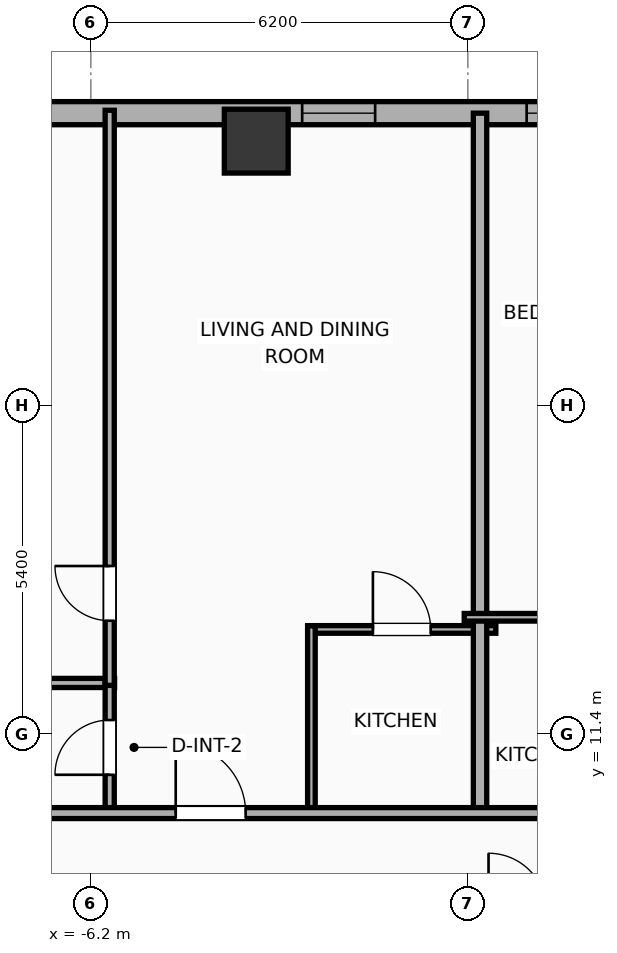
"""IFC4 building model, lengths in metres.
Left out: names, types, materials, properties, quantities, classifications, styles, units other than length and angle.
Written with IfcOpenShell. Run it as: python <this file> out.ifc"""

import sys

from ifc_helpers import new_model, si_unit, direction, frame, frame_2d, origin, origin_2d, place, context, subcontext, project, spatial, rectangle, hollow_rectangle, extrude, element, fill, save


model = new_model("IFC4")
c1 = context("Model", 3, precision=1e-05, world=origin(), true_north=direction((0.0, 1.0)))
c2 = subcontext(c1, "Body", "Model", "MODEL_VIEW")
j1 = project(units=[si_unit("LENGTHUNIT", "METRE"), si_unit("PLANEANGLEUNIT", "RADIAN")], contexts=[c1])
p1 = place(None, origin())
s1 = spatial("IfcSite", under=j1, at=p1, CompositionType="ELEMENT")
p2 = place(p1, origin())
s2 = spatial("IfcBuilding", under=s1, at=p2, CompositionType="ELEMENT")
p3 = place(p2, frame((0.0, 0.0, 101.4)))
s3 = spatial("IfcBuildingStorey", under=s2, at=p3, CompositionType="ELEMENT", Elevation=101.4)
p4 = place(p3, frame((-3.48, 21.15, 0.0), z_axis=(0.0, 0.0, 1.0), x_axis=(1.0, 0.0, 0.0)))
e1 = element("IfcColumn", 1, at=p4, inside=s3, PredefinedType="COLUMN", context=c2, shape_type="SweptSolid", body=[
    extrude(hollow_rectangle(XDim=1.05, YDim=1.05, WallThickness=0.036, at=origin_2d()), origin(), (0.0, 0.0, 1.0), 3.9),
])
p5 = place(p3, frame((-25.381, 21.61, 0.0), z_axis=(0.0, 0.0, 1.0), x_axis=(1.0, 0.0, 0.0)))
e2 = element("IfcWall", 2, at=p5, inside=s3, PredefinedType="ELEMENTEDWALL", context=c2, shape_type="SweptSolid", body=[
    extrude(rectangle(XDim=54.763, YDim=0.38, at=frame_2d((27.381, 0.0))), origin(), (0.0, 0.0, 1.0), 3.65),
])
p6 = place(p5, frame((45.067, 0.0, 0.75)))
e3 = element("IfcOpeningElement", 3, at=p6, cuts=e2, PredefinedType="OPENING", context=c2, shape_type="SweptSolid", body=[
    extrude(rectangle(XDim=2.4, YDim=2.1, at=frame_2d((1.2, 1.05))), frame((0.0, 0.2, 0.0), z_axis=(0.0, -1.0, 0.0), x_axis=(1.0, 0.0, 0.0)), (0.0, 0.0, 1.0), 0.4),
])
p7 = place(p5, frame((4.076, 0.0, 0.75)))
e4 = element("IfcOpeningElement", 4, at=p7, cuts=e2, PredefinedType="OPENING", context=c2, shape_type="SweptSolid", body=[
    extrude(rectangle(XDim=1.2, YDim=2.05, at=frame_2d((0.6, 1.025))), frame((0.0, 0.2, 0.0), z_axis=(0.0, -1.0, 0.0), x_axis=(1.0, 0.0, 0.0)), (0.0, 0.0, 1.0), 0.4),
])
p8 = place(p5, frame((9.395, 0.0, 0.75)))
e5 = element("IfcOpeningElement", 5, at=p8, cuts=e2, PredefinedType="OPENING", context=c2, shape_type="SweptSolid", body=[
    extrude(rectangle(XDim=0.85, YDim=2.05, at=frame_2d((0.425, 1.025))), frame((0.0, 0.2, 0.0), z_axis=(0.0, -1.0, 0.0), x_axis=(1.0, 0.0, 0.0)), (0.0, 0.0, 1.0), 0.4),
])
p9 = place(p5, frame((7.205, 0.0, 0.75)))
e6 = element("IfcOpeningElement", 6, at=p9, cuts=e2, PredefinedType="OPENING", context=c2, shape_type="SweptSolid", body=[
    extrude(rectangle(XDim=1.2, YDim=2.05, at=frame_2d((0.6, 1.025))), frame((0.0, 0.2, 0.0), z_axis=(0.0, -1.0, 0.0), x_axis=(1.0, 0.0, 0.0)), (0.0, 0.0, 1.0), 0.4),
])
p10 = place(p5, frame((13.676, 0.0, 0.75)))
e7 = element("IfcOpeningElement", 7, at=p10, cuts=e2, PredefinedType="OPENING", context=c2, shape_type="SweptSolid", body=[
    extrude(rectangle(XDim=1.2, YDim=2.05, at=frame_2d((0.6, 1.025))), frame((0.0, 0.2, 0.0), z_axis=(0.0, -1.0, 0.0), x_axis=(1.0, 0.0, 0.0)), (0.0, 0.0, 1.0), 0.4),
])
p11 = place(p5, frame((17.136, 0.0, 0.75)))
e8 = element("IfcOpeningElement", 8, at=p11, cuts=e2, PredefinedType="OPENING", context=c2, shape_type="SweptSolid", body=[
    extrude(rectangle(XDim=1.2, YDim=2.05, at=frame_2d((0.6, 1.025))), frame((0.0, 0.2, 0.0), z_axis=(0.0, -1.0, 0.0), x_axis=(1.0, 0.0, 0.0)), (0.0, 0.0, 1.0), 0.4),
])
p12 = place(p5, frame((22.656, 0.0, 0.75)))
e9 = element("IfcOpeningElement", 9, at=p12, cuts=e2, PredefinedType="OPENING", context=c2, shape_type="SweptSolid", body=[
    extrude(rectangle(XDim=1.2, YDim=2.05, at=frame_2d((0.6, 1.025))), frame((0.0, 0.2, 0.0), z_axis=(0.0, -1.0, 0.0), x_axis=(1.0, 0.0, 0.0)), (0.0, 0.0, 1.0), 0.4),
])
p13 = place(p5, frame((29.443, 0.0, 0.75)))
e10 = element("IfcOpeningElement", 10, at=p13, cuts=e2, PredefinedType="OPENING", context=c2, shape_type="SweptSolid", body=[
    extrude(rectangle(XDim=1.2, YDim=2.05, at=frame_2d((0.6, 1.025))), frame((0.0, 0.2, 0.0), z_axis=(0.0, -1.0, 0.0), x_axis=(1.0, 0.0, 0.0)), (0.0, 0.0, 1.0), 0.4),
])
p14 = place(p5, frame((26.348, 0.0, 0.75)))
e11 = element("IfcOpeningElement", 11, at=p14, cuts=e2, PredefinedType="OPENING", context=c2, shape_type="SweptSolid", body=[
    extrude(rectangle(XDim=1.2, YDim=2.05, at=frame_2d((0.6, 1.025))), frame((0.0, 0.2, 0.0), z_axis=(0.0, -1.0, 0.0), x_axis=(1.0, 0.0, 0.0)), (0.0, 0.0, 1.0), 0.4),
])
p15 = place(p5, frame((33.596, 0.0, 0.75)))
e12 = element("IfcOpeningElement", 12, at=p15, cuts=e2, PredefinedType="OPENING", context=c2, shape_type="SweptSolid", body=[
    extrude(rectangle(XDim=1.2, YDim=2.05, at=frame_2d((0.6, 1.025))), frame((0.0, 0.2, 0.0), z_axis=(0.0, -1.0, 0.0), x_axis=(1.0, 0.0, 0.0)), (0.0, 0.0, 1.0), 0.4),
])
p16 = place(p5, frame((36.014, 0.0, 0.75)))
e13 = element("IfcOpeningElement", 13, at=p16, cuts=e2, PredefinedType="OPENING", context=c2, shape_type="SweptSolid", body=[
    extrude(rectangle(XDim=1.2, YDim=2.05, at=frame_2d((0.6, 1.025))), frame((0.0, 0.2, 0.0), z_axis=(0.0, -1.0, 0.0), x_axis=(1.0, 0.0, 0.0)), (0.0, 0.0, 1.0), 0.4),
])
p17 = place(p5, frame((40.814, 0.0, 0.75)))
e14 = element("IfcOpeningElement", 14, at=p17, cuts=e2, PredefinedType="OPENING", context=c2, shape_type="SweptSolid", body=[
    extrude(rectangle(XDim=1.2, YDim=2.05, at=frame_2d((0.6, 1.025))), frame((0.0, 0.2, 0.0), z_axis=(0.0, -1.0, 0.0), x_axis=(1.0, 0.0, 0.0)), (0.0, 0.0, 1.0), 0.4),
])
p18 = place(p5, frame((49.385, 0.0, 0.75)))
e15 = element("IfcOpeningElement", 15, at=p18, cuts=e2, PredefinedType="OPENING", context=c2, shape_type="SweptSolid", body=[
    extrude(rectangle(XDim=1.2, YDim=2.05, at=frame_2d((0.6, 1.025))), frame((0.0, 0.2, 0.0), z_axis=(0.0, -1.0, 0.0), x_axis=(1.0, 0.0, 0.0)), (0.0, 0.0, 1.0), 0.4),
])
p19 = place(p5, frame((52.181, 0.0, 0.75)))
e16 = element("IfcOpeningElement", 16, at=p19, cuts=e2, PredefinedType="OPENING", context=c2, shape_type="SweptSolid", body=[
    extrude(rectangle(XDim=1.2, YDim=2.05, at=frame_2d((0.6, 1.025))), frame((0.0, 0.2, 0.0), z_axis=(0.0, -1.0, 0.0), x_axis=(1.0, 0.0, 0.0)), (0.0, 0.0, 1.0), 0.4),
])
p20 = place(p3, frame((-9.66, 12.24, 0.0), z_axis=(0.0, 0.0, 1.0), x_axis=(1.0, 0.0, 0.0)))
e17 = element("IfcWall", 17, at=p20, inside=s3, PredefinedType="PLUMBINGWALL", context=c2, shape_type="SweptSolid", body=[
    extrude(rectangle(XDim=3.85, YDim=0.15, at=frame_2d((1.925, 0.0))), origin(), (0.0, 0.0, 1.0), 3.65),
])
p21 = place(p3, frame((-5.89, 10.08, 0.0), z_axis=(0.0, 0.0, 1.0), x_axis=(0.0, 1.0, 0.0)))
e18 = element("IfcWall", 18, at=p21, inside=s3, PredefinedType="PLUMBINGWALL", context=c2, shape_type="SweptSolid", body=[
    extrude(rectangle(XDim=2.2, YDim=0.15, at=frame_2d((1.1, 0.0))), origin(), (0.0, 0.0, 1.0), 3.65),
])
p22 = place(p21, frame((0.65, 0.0, 0.0)))
e19 = element("IfcOpeningElement", 19, at=p22, cuts=e18, PredefinedType="OPENING", context=c2, shape_type="SweptSolid", body=[
    extrude(rectangle(XDim=0.9, YDim=2.05, at=frame_2d((0.45, 1.025))), frame((0.0, 0.085, 0.0), z_axis=(0.0, -1.0, 0.0), x_axis=(1.0, 0.0, 0.0)), (0.0, 0.0, 1.0), 0.17),
])
p23 = place(p3, frame((-5.89, 12.2, 0.0), z_axis=(0.0, 0.0, 1.0), x_axis=(0.0, 1.0, 0.0)))
e20 = element("IfcWall", 20, at=p23, inside=s3, PredefinedType="PLUMBINGWALL", context=c2, shape_type="SweptSolid", body=[
    extrude(rectangle(XDim=9.458, YDim=0.15, at=frame_2d((4.729, 0.0))), origin(), (0.0, 0.0, 1.0), 3.65),
])
p24 = place(p23, frame((1.063, 0.0, 0.0)))
e21 = element("IfcOpeningElement", 21, at=p24, cuts=e20, PredefinedType="OPENING", context=c2, shape_type="SweptSolid", body=[
    extrude(rectangle(XDim=0.9, YDim=2.05, at=frame_2d((0.45, 1.025))), frame((0.0, 0.085, 0.0), z_axis=(0.0, -1.0, 0.0), x_axis=(1.0, 0.0, 0.0)), (0.0, 0.0, 1.0), 0.17),
])
p25 = place(p3, frame((-2.633, 13.12, 0.0), z_axis=(0.0, 0.0, 1.0), x_axis=(1.0, 0.0, 0.0)))
e22 = element("IfcWall", 22, at=p25, inside=s3, PredefinedType="PARTITIONING", context=c2, shape_type="SweptSolid", body=[
    extrude(rectangle(XDim=3.093, YDim=0.125, at=frame_2d((1.546, 0.0))), origin(), (0.0, 0.0, 1.0), 3.65),
])
p26 = place(p25, frame((1.072, 0.0, 0.0)))
e23 = element("IfcOpeningElement", 23, at=p26, cuts=e22, PredefinedType="OPENING", context=c2, shape_type="SweptSolid", body=[
    extrude(rectangle(XDim=0.95, YDim=2.05, at=frame_2d((0.475, 1.025))), frame((0.0, 0.073, 0.0), z_axis=(0.0, -1.0, 0.0), x_axis=(1.0, 0.0, 0.0)), (0.0, 0.0, 1.0), 0.145),
])
p27 = place(p3, frame((-2.573, 10.08, 0.0), z_axis=(0.0, 0.0, 1.0), x_axis=(0.0, 1.0, 0.0)))
e24 = element("IfcWall", 24, at=p27, inside=s3, PredefinedType="PARTITIONING", context=c2, shape_type="SweptSolid", body=[
    extrude(rectangle(XDim=3.1, YDim=0.125, at=frame_2d((1.55, 0.0))), origin(), (0.0, 0.0, 1.0), 3.65),
])
p28 = place(p3, frame((0.2, 10.02, 0.0), z_axis=(0.0, 0.0, 1.0), x_axis=(0.0, 1.0, 0.0)))
e25 = element("IfcWall", 25, at=p28, inside=s3, PredefinedType="PARTITIONING", context=c2, shape_type="SweptSolid", body=[
    extrude(rectangle(XDim=11.59, YDim=0.22, at=frame_2d((5.795, 0.0))), origin(), (0.0, 0.0, 1.0), 3.65),
])
p29 = place(p3, frame((-0.06, 13.32, 0.0), z_axis=(0.0, 0.0, 1.0), x_axis=(1.0, 0.0, 0.0)))
e26 = element("IfcWall", 26, at=p29, inside=s3, PredefinedType="PARTITIONING", context=c2, shape_type="SweptSolid", body=[
    extrude(rectangle(XDim=3.113, YDim=0.125, at=frame_2d((1.557, 0.0))), origin(), (0.0, 0.0, 1.0), 3.65),
])
p30 = place(p3, frame((-29.21, 10.1, 0.0), z_axis=(0.0, 0.0, 1.0), x_axis=(1.0, 0.0, 0.0)))
e27 = element("IfcWall", 27, at=p30, inside=s3, PredefinedType="PARTITIONING", context=c2, shape_type="SweptSolid", body=[
    extrude(rectangle(XDim=62.42, YDim=0.18, at=frame_2d((31.21, 0.0))), origin(), (0.0, 0.0, 1.0), 3.65),
])
p31 = place(p30, frame((4.906, 0.0, 0.0)))
e28 = element("IfcOpeningElement", 28, at=p31, cuts=e27, PredefinedType="OPENING", context=c2, shape_type="SweptSolid", body=[
    extrude(rectangle(XDim=1.15, YDim=2.05, at=frame_2d((0.575, 1.025))), frame((0.0, 0.1, 0.0), z_axis=(0.0, -1.0, 0.0), x_axis=(1.0, 0.0, 0.0)), (0.0, 0.0, 1.0), 0.2),
])
p32 = place(p30, frame((14.812, 0.0, 0.0)))
e29 = element("IfcOpeningElement", 29, at=p32, cuts=e27, PredefinedType="OPENING", context=c2, shape_type="SweptSolid", body=[
    extrude(rectangle(XDim=1.15, YDim=2.05, at=frame_2d((0.575, 1.025))), frame((0.0, 0.1, 0.0), z_axis=(0.0, -1.0, 0.0), x_axis=(1.0, 0.0, 0.0)), (0.0, 0.0, 1.0), 0.2),
])
p33 = place(p30, frame((24.406, 0.0, 0.0)))
e30 = element("IfcOpeningElement", 30, at=p33, cuts=e27, PredefinedType="OPENING", context=c2, shape_type="SweptSolid", body=[
    extrude(rectangle(XDim=1.15, YDim=2.05, at=frame_2d((0.575, 1.025))), frame((0.0, 0.1, 0.0), z_axis=(0.0, -1.0, 0.0), x_axis=(1.0, 0.0, 0.0)), (0.0, 0.0, 1.0), 0.2),
])
p34 = place(p30, frame((33.981, 0.0, 0.0)))
e31 = element("IfcOpeningElement", 31, at=p34, cuts=e27, PredefinedType="OPENING", context=c2, shape_type="SweptSolid", body=[
    extrude(rectangle(XDim=1.15, YDim=2.05, at=frame_2d((0.575, 1.025))), frame((0.0, 0.1, 0.0), z_axis=(0.0, -1.0, 0.0), x_axis=(1.0, 0.0, 0.0)), (0.0, 0.0, 1.0), 0.2),
])
p35 = place(p30, frame((43.138, 0.0, 0.0)))
e32 = element("IfcOpeningElement", 32, at=p35, cuts=e27, PredefinedType="OPENING", context=c2, shape_type="SweptSolid", body=[
    extrude(rectangle(XDim=1.15, YDim=2.05, at=frame_2d((0.575, 1.025))), frame((0.0, 0.1, 0.0), z_axis=(0.0, -1.0, 0.0), x_axis=(1.0, 0.0, 0.0)), (0.0, 0.0, 1.0), 0.2),
])
p36 = place(p30, frame((51.777, 0.0, 0.0)))
e33 = element("IfcOpeningElement", 33, at=p36, cuts=e27, PredefinedType="OPENING", context=c2, shape_type="SweptSolid", body=[
    extrude(rectangle(XDim=0.9, YDim=2.05, at=frame_2d((0.45, 1.025))), frame((0.0, 0.1, 0.0), z_axis=(0.0, -1.0, 0.0), x_axis=(1.0, 0.0, 0.0)), (0.0, 0.0, 1.0), 0.2),
])
p37 = place(p30, frame((58.718, 0.0, 0.0)))
e34 = element("IfcOpeningElement", 34, at=p37, cuts=e27, PredefinedType="OPENING", context=c2, shape_type="SweptSolid", body=[
    extrude(rectangle(XDim=0.9, YDim=2.05, at=frame_2d((0.45, 1.025))), frame((0.0, 0.1, 0.0), z_axis=(0.0, -1.0, 0.0), x_axis=(1.0, 0.0, 0.0)), (0.0, 0.0, 1.0), 0.2),
])
p38 = place(p12, origin())
e35 = element("IfcWindow", 35, at=p38, inside=s3, PartitioningType="SINGLE_PANEL", PredefinedType="WINDOW", context=c2, shape_type="SweptSolid", body=[
    extrude(rectangle(XDim=1.2, YDim=2.05, at=frame_2d((0.6, 1.025))), frame((0.0, 0.03, 0.0), z_axis=(0.0, -1.0, 0.0), x_axis=(1.0, 0.0, 0.0)), (0.0, 0.0, 1.0), 0.06),
])
fill(e9, e35)
p39 = place(p14, origin())
e36 = element("IfcWindow", 36, at=p39, inside=s3, PartitioningType="SINGLE_PANEL", PredefinedType="WINDOW", context=c2, shape_type="SweptSolid", body=[
    extrude(rectangle(XDim=1.2, YDim=2.05, at=frame_2d((0.6, 1.025))), frame((0.0, 0.03, 0.0), z_axis=(0.0, -1.0, 0.0), x_axis=(1.0, 0.0, 0.0)), (0.0, 0.0, 1.0), 0.06),
])
fill(e11, e36)
p40 = place(p22, origin())
e37 = element("IfcDoor", 37, at=p40, inside=s3, OperationType="SINGLE_SWING_LEFT", PredefinedType="DOOR", context=c2, shape_type="SweptSolid", body=[
    extrude(rectangle(XDim=0.9, YDim=2.05, at=frame_2d((0.45, 1.025))), frame((0.0, 0.025, 0.0), z_axis=(0.0, -1.0, 0.0), x_axis=(1.0, 0.0, 0.0)), (0.0, 0.0, 1.0), 0.05),
])
fill(e19, e37)
p41 = place(p24, origin())
e38 = element("IfcDoor", 38, at=p41, inside=s3, OperationType="SINGLE_SWING_RIGHT", PredefinedType="DOOR", context=c2, shape_type="SweptSolid", body=[
    extrude(rectangle(XDim=0.9, YDim=2.05, at=frame_2d((0.45, 1.025))), frame((0.0, 0.025, 0.0), z_axis=(0.0, -1.0, 0.0), x_axis=(1.0, 0.0, 0.0)), (0.0, 0.0, 1.0), 0.05),
])
fill(e21, e38)
p42 = place(p26, origin())
e39 = element("IfcDoor", 39, at=p42, inside=s3, OperationType="SINGLE_SWING_LEFT", PredefinedType="DOOR", context=c2, shape_type="SweptSolid", body=[
    extrude(rectangle(XDim=0.95, YDim=2.05, at=frame_2d((0.475, 1.025))), frame((0.0, 0.025, 0.0), z_axis=(0.0, -1.0, 0.0), x_axis=(1.0, 0.0, 0.0)), (0.0, 0.0, 1.0), 0.05),
])
fill(e23, e39)
p43 = place(p33, origin())
e40 = element("IfcDoor", 40, at=p43, inside=s3, OperationType="SINGLE_SWING_LEFT", PredefinedType="DOOR", context=c2, shape_type="SweptSolid", body=[
    extrude(rectangle(XDim=1.15, YDim=2.05, at=frame_2d((0.575, 1.025))), frame((0.0, 0.025, 0.0), z_axis=(0.0, -1.0, 0.0), x_axis=(1.0, 0.0, 0.0)), (0.0, 0.0, 1.0), 0.05),
])
fill(e30, e40)
save(model, sys.argv[1])
